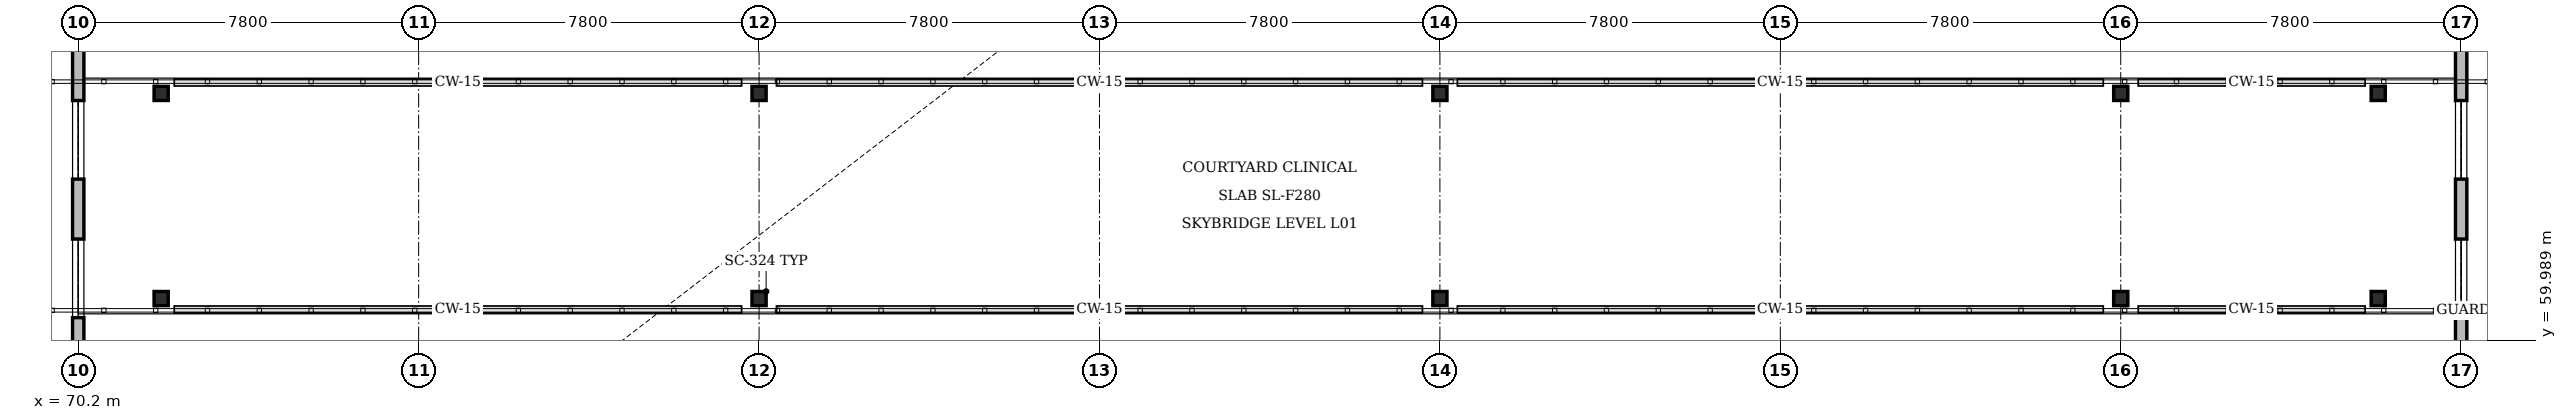
"""IFC4 building model, lengths in metres.
Left out: names, types, materials, properties, quantities, classifications, styles, units other than length and angle.
Written with IfcOpenShell. Run it as: python <this file> out.ifc"""

import sys

from ifc_helpers import new_model, si_unit, direction, frame, frame_2d, origin, origin_2d, place, context, subcontext, project, spatial, rectangle, hollow_circle, extrude, element, fill, save


model = new_model("IFC4")
c1 = context("Model", 3, precision=1e-05, world=origin(), true_north=direction((0.0, 1.0)))
c2 = subcontext(c1, "Body", "Model", "MODEL_VIEW")
j1 = project(units=[si_unit("LENGTHUNIT", "METRE"), si_unit("PLANEANGLEUNIT", "RADIAN")], contexts=[c1])
p1 = place(None, origin())
s1 = spatial("IfcSite", under=j1, at=p1, CompositionType="ELEMENT")
p2 = place(p1, origin())
s2 = spatial("IfcBuilding", under=s1, at=p2, CompositionType="ELEMENT")
p3 = place(p2, frame((0.0, 0.0, 4.8)))
s3 = spatial("IfcBuildingStorey", under=s2, at=p3, CompositionType="ELEMENT", Elevation=4.8)
for number, where, z_axis, x_axis in (
    (1, (85.8, 60.95, 0.0), (0.0, 0.0, 1.0), (1.0, 0.0, 0.0)),
    (2, (85.8, 65.65, 0.0), (0.0, 0.0, 1.0), (1.0, 0.0, 0.0)),
    (3, (101.4, 60.95, 0.0), (0.0, 0.0, 1.0), (1.0, 0.0, 0.0)),
    (4, (101.4, 65.65, 0.0), (0.0, 0.0, 1.0), (1.0, 0.0, 0.0)),
    (5, (117.0, 60.95, 0.0), (0.0, 0.0, 1.0), (1.0, 0.0, 0.0)),
    (6, (117.0, 65.65, 0.0), (0.0, 0.0, 1.0), (1.0, 0.0, 0.0)),
    (7, (72.1, 60.95, 0.0), (0.0, 0.0, 1.0), (1.0, 0.0, 0.0)),
    (8, (72.1, 65.65, 0.0), (0.0, 0.0, 1.0), (1.0, 0.0, 0.0)),
    (9, (122.9, 60.95, 0.0), (0.0, 0.0, 1.0), (1.0, 0.0, 0.0)),
    (10, (122.9, 65.65, 0.0), (0.0, 0.0, 1.0), (1.0, 0.0, 0.0)),
):
    element("IfcColumn", number, at=place(p3, frame(where, z_axis=z_axis, x_axis=x_axis)), inside=s3, PredefinedType="COLUMN", context=c2, shape_type="SweptSolid", body=[
        extrude(hollow_circle(Radius=0.162, WallThickness=0.012, at=origin_2d()), origin(), (0.0, 0.0, 1.0), 3.64),
    ])
p4 = place(p3, frame((70.2, 59.14, 0.0), z_axis=(0.0, 0.0, 1.0), x_axis=(0.0, 1.0, 0.0)))
e11 = element("IfcWall", 11, at=p4, inside=s3, PredefinedType="STANDARD", context=c2, shape_type="SweptSolid", body=[
    extrude(rectangle(XDim=7.72, YDim=0.26, at=frame_2d((3.86, 0.0))), origin(), (0.0, 0.0, 1.0), 3.665),
])
p5 = place(p4, frame((1.373, 0.0, 0.9)))
e12 = element("IfcOpeningElement", 12, at=p5, cuts=e11, PredefinedType="OPENING", context=c2, shape_type="SweptSolid", body=[
    extrude(rectangle(XDim=1.8, YDim=1.65, at=frame_2d((0.9, 0.825))), frame((0.0, 0.14, 0.0), z_axis=(0.0, -1.0, 0.0), x_axis=(1.0, 0.0, 0.0)), (0.0, 0.0, 1.0), 0.28),
])
p6 = place(p4, frame((4.547, 0.0, 0.9)))
e13 = element("IfcOpeningElement", 13, at=p6, cuts=e11, PredefinedType="OPENING", context=c2, shape_type="SweptSolid", body=[
    extrude(rectangle(XDim=1.8, YDim=1.65, at=frame_2d((0.9, 0.825))), frame((0.0, 0.14, 0.0), z_axis=(0.0, -1.0, 0.0), x_axis=(1.0, 0.0, 0.0)), (0.0, 0.0, 1.0), 0.28),
])
p7 = place(p3, frame((124.8, 66.86, 0.0), z_axis=(0.0, 0.0, 1.0), x_axis=(0.0, -1.0, 0.0)))
e14 = element("IfcWall", 14, at=p7, inside=s3, PredefinedType="STANDARD", context=c2, shape_type="SweptSolid", body=[
    extrude(rectangle(XDim=7.72, YDim=0.26, at=frame_2d((3.86, 0.0))), origin(), (0.0, 0.0, 1.0), 3.665),
])
p8 = place(p7, frame((1.373, 0.0, 0.9)))
e15 = element("IfcOpeningElement", 15, at=p8, cuts=e14, PredefinedType="OPENING", context=c2, shape_type="SweptSolid", body=[
    extrude(rectangle(XDim=1.8, YDim=1.65, at=frame_2d((0.9, 0.825))), frame((0.0, 0.14, 0.0), z_axis=(0.0, -1.0, 0.0), x_axis=(1.0, 0.0, 0.0)), (0.0, 0.0, 1.0), 0.28),
])
p9 = place(p7, frame((4.547, 0.0, 0.9)))
e16 = element("IfcOpeningElement", 16, at=p9, cuts=e14, PredefinedType="OPENING", context=c2, shape_type="SweptSolid", body=[
    extrude(rectangle(XDim=1.8, YDim=1.65, at=frame_2d((0.9, 0.825))), frame((0.0, 0.14, 0.0), z_axis=(0.0, -1.0, 0.0), x_axis=(1.0, 0.0, 0.0)), (0.0, 0.0, 1.0), 0.28),
])
p10 = place(p5, origin())
e17 = element("IfcWindow", 17, at=p10, inside=s3, PartitioningType="SINGLE_PANEL", PredefinedType="WINDOW", context=c2, shape_type="SweptSolid", body=[
    extrude(rectangle(XDim=1.8, YDim=1.65, at=frame_2d((0.9, 0.825))), frame((0.0, 0.03, 0.0), z_axis=(0.0, -1.0, 0.0), x_axis=(1.0, 0.0, 0.0)), (0.0, 0.0, 1.0), 0.06),
])
fill(e12, e17)
p11 = place(p6, origin())
e18 = element("IfcWindow", 18, at=p11, inside=s3, PartitioningType="SINGLE_PANEL", PredefinedType="WINDOW", context=c2, shape_type="SweptSolid", body=[
    extrude(rectangle(XDim=1.8, YDim=1.65, at=frame_2d((0.9, 0.825))), frame((0.0, 0.03, 0.0), z_axis=(0.0, -1.0, 0.0), x_axis=(1.0, 0.0, 0.0)), (0.0, 0.0, 1.0), 0.06),
])
fill(e13, e18)
p12 = place(p8, origin())
e19 = element("IfcWindow", 19, at=p12, inside=s3, PartitioningType="SINGLE_PANEL", PredefinedType="WINDOW", context=c2, shape_type="SweptSolid", body=[
    extrude(rectangle(XDim=1.8, YDim=1.65, at=frame_2d((0.9, 0.825))), frame((0.0, 0.03, 0.0), z_axis=(0.0, -1.0, 0.0), x_axis=(1.0, 0.0, 0.0)), (0.0, 0.0, 1.0), 0.06),
])
fill(e15, e19)
p13 = place(p9, origin())
e20 = element("IfcWindow", 20, at=p13, inside=s3, PartitioningType="SINGLE_PANEL", PredefinedType="WINDOW", context=c2, shape_type="SweptSolid", body=[
    extrude(rectangle(XDim=1.8, YDim=1.65, at=frame_2d((0.9, 0.825))), frame((0.0, 0.03, 0.0), z_axis=(0.0, -1.0, 0.0), x_axis=(1.0, 0.0, 0.0)), (0.0, 0.0, 1.0), 0.06),
])
fill(e16, e20)
save(model, sys.argv[1])
